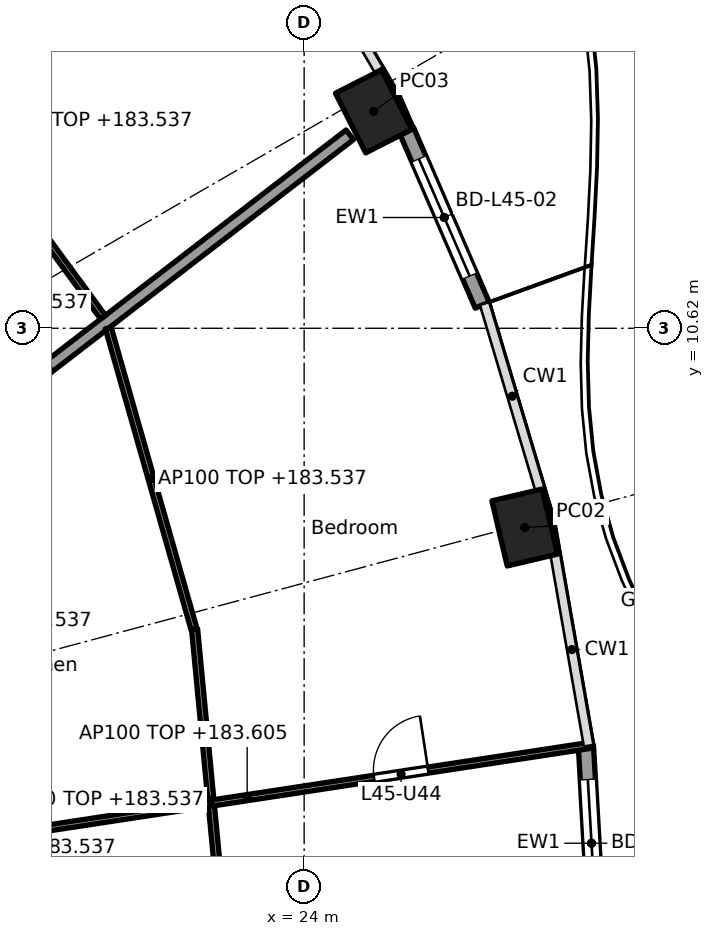
"""IFC4 building model, lengths in metres.
Left out: names, types, materials, properties, quantities, classifications, styles, units other than length and angle.
Written with IfcOpenShell. Run it as: python <this file> out.ifc"""

import sys

from ifc_helpers import new_model, si_unit, direction, frame, frame_2d, origin, origin_2d, place, context, subcontext, project, spatial, rectangle, hollow_rectangle, extrude, element, fill, save


model = new_model("IFC4")
c1 = context("Model", 3, precision=1e-05, world=origin(), true_north=direction((0.0, 1.0)))
c2 = subcontext(c1, "Body", "Model", "MODEL_VIEW")
j1 = project(units=[si_unit("LENGTHUNIT", "METRE"), si_unit("PLANEANGLEUNIT", "RADIAN")], contexts=[c1])
p1 = place(None, origin())
s1 = spatial("IfcSite", under=j1, at=p1, CompositionType="ELEMENT")
p2 = place(p1, origin())
s2 = spatial("IfcBuilding", under=s1, at=p2, CompositionType="ELEMENT")
p3 = place(p2, frame((0.0, 0.0, 180.7)))
s3 = spatial("IfcBuildingStorey", under=s2, at=p3, CompositionType="ELEMENT", Elevation=180.7)
for number, where, z_axis, x_axis in (
    (1, (27.627, 7.344, 0.0), (0.0, 0.0, 1.0), (-0.229, 0.973, 0.0)),
    (2, (25.142, 14.188, 0.0), (0.0, 0.0, 1.0), (-0.452, 0.892, 0.0)),
):
    element("IfcColumn", number, at=place(p3, frame(where, z_axis=z_axis, x_axis=x_axis)), inside=s3, PredefinedType="COLUMN", context=c2, shape_type="SweptSolid", body=[
        extrude(hollow_rectangle(XDim=1.1, YDim=0.85, WallThickness=0.036, at=origin_2d()), origin(), (0.0, 0.0, 1.0), 3.7),
    ])
p4 = place(p3, frame((28.633, 3.762, 0.0), z_axis=(0.0, 0.0, 1.0), x_axis=(0.057532692854, -0.998343622834, 0.0)))
e3 = element("IfcWall", 3, at=p4, inside=s3, PredefinedType="SOLIDWALL", context=c2, shape_type="SweptSolid", body=[
    extrude(rectangle(XDim=3.225, YDim=0.25, at=frame_2d((1.613, 0.0))), origin(), (0.0, 0.0, 1.0), 3.44),
])
p5 = place(p4, frame((0.562, 0.0, 0.0)))
e4 = element("IfcOpeningElement", 4, at=p5, cuts=e3, PredefinedType="OPENING", context=c2, shape_type="SweptSolid", body=[
    extrude(rectangle(XDim=2.1, YDim=2.4, at=frame_2d((1.05, 1.2))), frame((0.0, 0.135, 0.0), z_axis=(0.0, -1.0, 0.0), x_axis=(1.0, 0.0, 0.0)), (0.0, 0.0, 1.0), 0.27),
])
p6 = place(p3, frame((25.679, 13.883, 0.0), z_axis=(0.0, 0.0, 1.0), x_axis=(0.397620521824, -0.917549955384, 0.0)))
e5 = element("IfcWall", 5, at=p6, inside=s3, PredefinedType="SOLIDWALL", context=c2, shape_type="SweptSolid", body=[
    extrude(rectangle(XDim=3.142, YDim=0.25, at=frame_2d((1.571, 0.0))), origin(), (0.0, 0.0, 1.0), 3.44),
])
p7 = place(p6, frame((0.521, 0.0, 0.0)))
e6 = element("IfcOpeningElement", 6, at=p7, cuts=e5, PredefinedType="OPENING", context=c2, shape_type="SweptSolid", body=[
    extrude(rectangle(XDim=2.1, YDim=2.4, at=frame_2d((1.05, 1.2))), frame((0.0, 0.135, 0.0), z_axis=(0.0, -1.0, 0.0), x_axis=(1.0, 0.0, 0.0)), (0.0, 0.0, 1.0), 0.27),
])
p8 = place(p3, frame((14.822, 6.154, 0.0), z_axis=(0.0, 0.0, 1.0), x_axis=(0.792203056092, 0.610257583254, 0.0)))
e7 = element("IfcWall", 7, at=p8, inside=s3, PredefinedType="PARTITIONING", context=c2, shape_type="SweptSolid", body=[
    extrude(rectangle(XDim=12.533, YDim=0.2, at=frame_2d((6.266, 0.0))), origin(), (0.0, 0.0, 1.0), 2.837),
])
p9 = place(p3, frame((22.734, 0.05, 0.0), z_axis=(0.0, 0.0, 1.0), x_axis=(-0.0949274088, 0.995484197292, 0.0)))
e8 = element("IfcWall", 8, at=p9, inside=s3, PredefinedType="PARTITIONING", context=c2, shape_type="SweptSolid", body=[
    extrude(rectangle(XDim=5.648, YDim=0.1, at=frame_2d((2.824, 0.0))), origin(), (0.0, 0.0, 1.0), 2.837),
])
p10 = place(p3, frame((17.407, 2.039, 0.0), z_axis=(0.0, 0.0, 1.0), x_axis=(0.98858728603, 0.150649188184, 0.0)))
e9 = element("IfcWall", 9, at=p10, inside=s3, PredefinedType="PARTITIONING", context=c2, shape_type="SweptSolid", body=[
    extrude(rectangle(XDim=11.441, YDim=0.1, at=frame_2d((5.721, 0.0))), origin(), (0.0, 0.0, 1.0), 2.905),
])
p11 = place(p10, frame((7.832, 0.0, 0.0)))
e10 = element("IfcOpeningElement", 10, at=p11, cuts=e9, PredefinedType="OPENING", context=c2, shape_type="SweptSolid", body=[
    extrude(rectangle(XDim=0.9, YDim=2.1, at=frame_2d((0.45, 1.05))), frame((0.0, 0.06, 0.0), z_axis=(0.0, -1.0, 0.0), x_axis=(1.0, 0.0, 0.0)), (0.0, 0.0, 1.0), 0.12),
])
p12 = place(p3, frame((22.189, 5.67, 0.0), z_axis=(0.0, 0.0, 1.0), x_axis=(-0.273819702124, 0.961781040949, 0.0)))
e11 = element("IfcWall", 11, at=p12, inside=s3, PredefinedType="PARTITIONING", context=c2, shape_type="SweptSolid", body=[
    extrude(rectangle(XDim=5.152, YDim=0.1, at=frame_2d((2.576, 0.0))), origin(), (0.0, 0.0, 1.0), 2.837),
])
p13 = place(p3, frame((20.692, 10.802, 0.0), z_axis=(0.0, 0.0, 1.0), x_axis=(-0.591110768293, 0.806590391468, 0.0)))
e12 = element("IfcWall", 12, at=p13, inside=s3, PredefinedType="PARTITIONING", context=c2, shape_type="SweptSolid", body=[
    extrude(rectangle(XDim=5.86, YDim=0.1, at=frame_2d((2.93, 0.0))), origin(), (0.0, 0.0, 1.0), 2.837),
])
p14 = place(p5, origin())
e13 = element("IfcDoor", 13, at=p14, inside=s3, OperationType="SLIDING_TO_LEFT", PredefinedType="DOOR", context=c2, shape_type="SweptSolid", body=[
    extrude(rectangle(XDim=2.1, YDim=2.4, at=frame_2d((1.05, 1.2))), frame((0.0, 0.025, 0.0), z_axis=(0.0, -1.0, 0.0), x_axis=(1.0, 0.0, 0.0)), (0.0, 0.0, 1.0), 0.05),
])
fill(e4, e13)
p15 = place(p7, origin())
e14 = element("IfcDoor", 14, at=p15, inside=s3, OperationType="SLIDING_TO_LEFT", PredefinedType="DOOR", context=c2, shape_type="SweptSolid", body=[
    extrude(rectangle(XDim=2.1, YDim=2.4, at=frame_2d((1.05, 1.2))), frame((0.0, 0.025, 0.0), z_axis=(0.0, -1.0, 0.0), x_axis=(1.0, 0.0, 0.0)), (0.0, 0.0, 1.0), 0.05),
])
fill(e6, e14)
p16 = place(p11, origin())
e15 = element("IfcDoor", 15, at=p16, inside=s3, OperationType="SINGLE_SWING_RIGHT", PredefinedType="DOOR", context=c2, shape_type="SweptSolid", body=[
    extrude(rectangle(XDim=0.9, YDim=2.1, at=frame_2d((0.45, 1.05))), frame((0.0, 0.025, 0.0), z_axis=(0.0, -1.0, 0.0), x_axis=(1.0, 0.0, 0.0)), (0.0, 0.0, 1.0), 0.05),
])
fill(e10, e15)
save(model, sys.argv[1])
